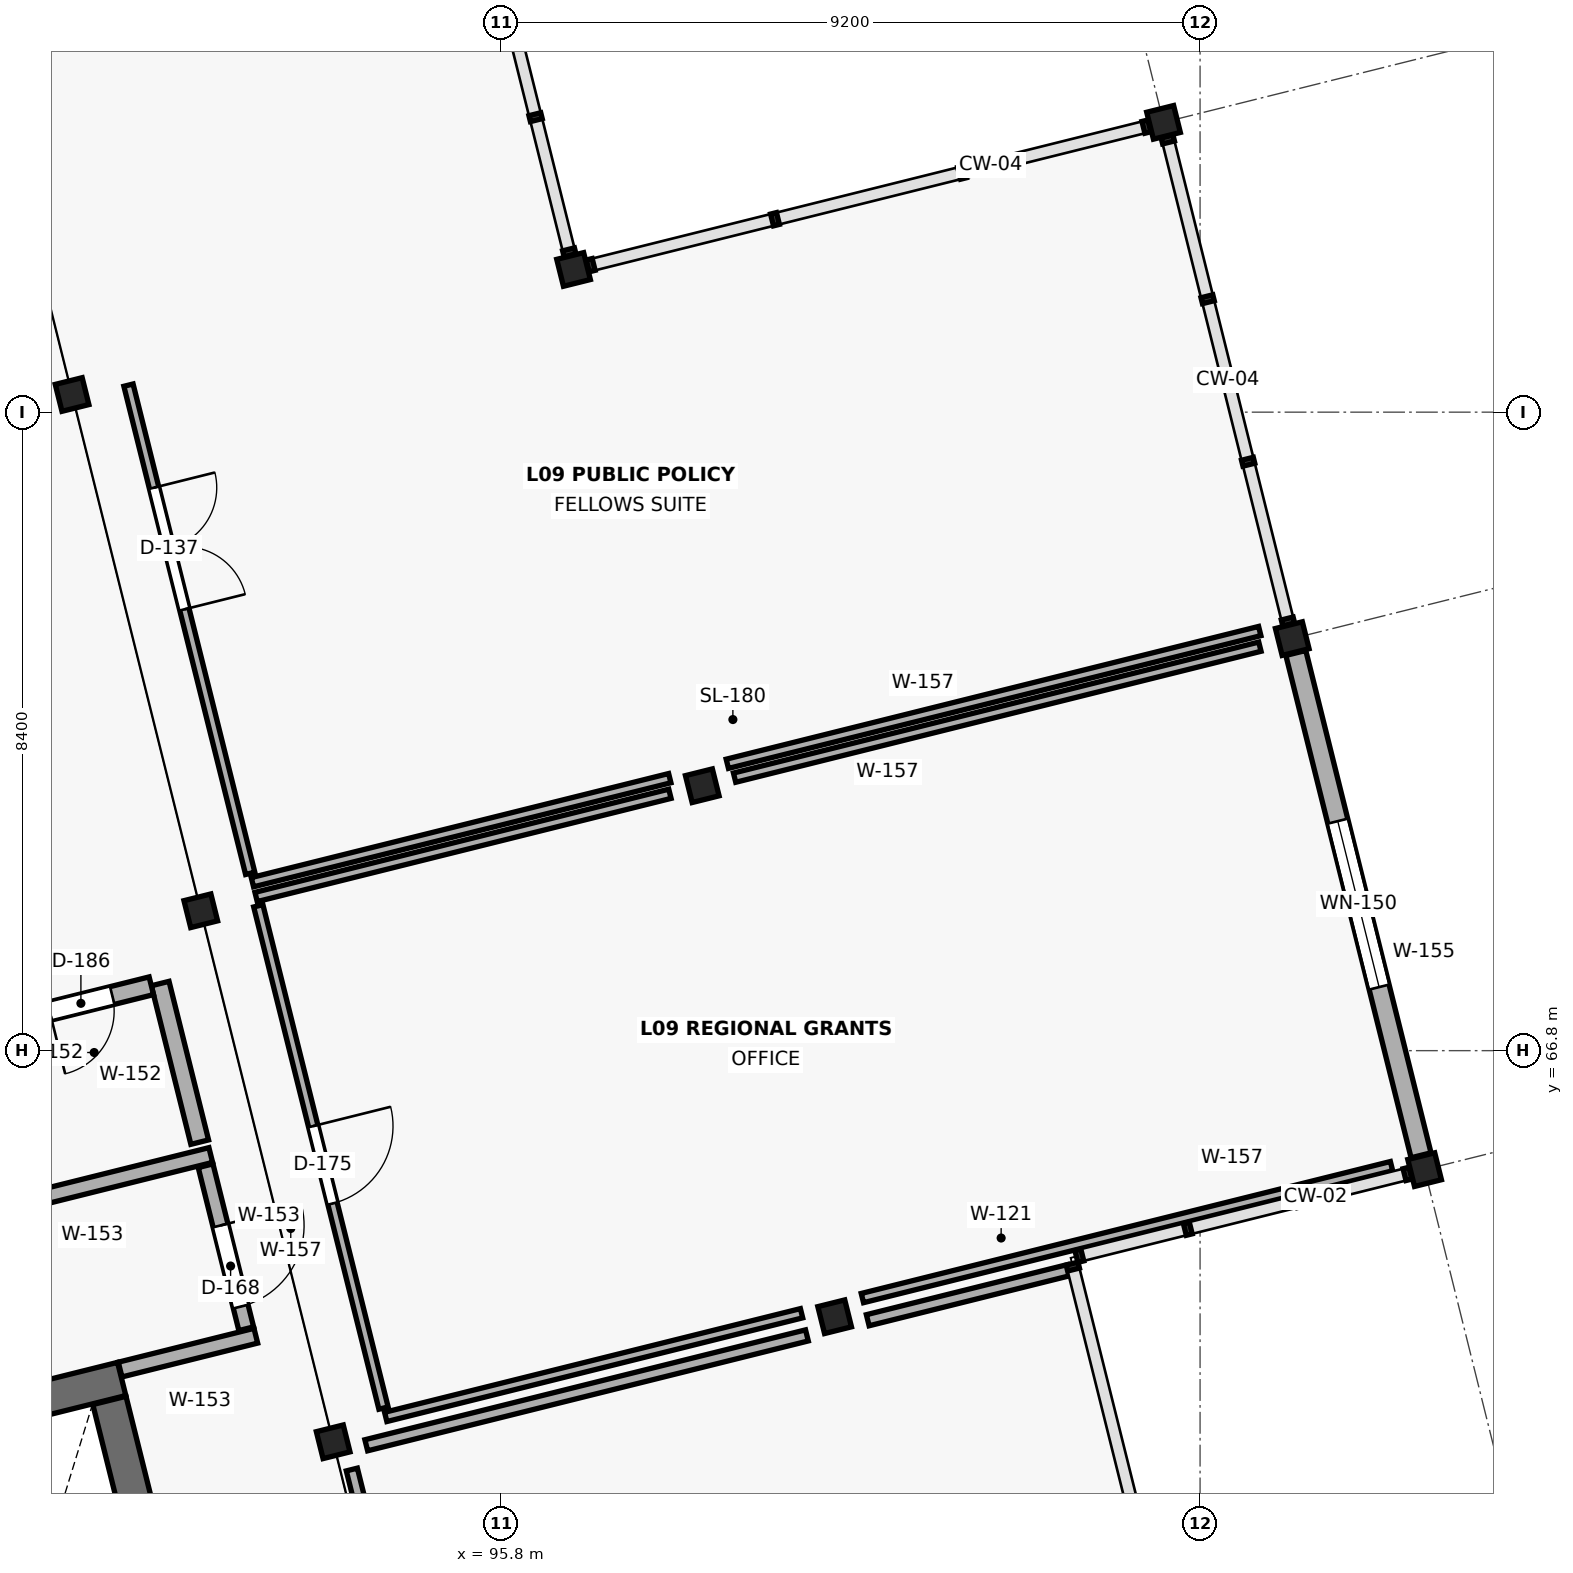
"""IFC4 building model, lengths in metres.
Left out: names, types, materials, properties, quantities, classifications, styles, units other than length and angle.
Written with IfcOpenShell. Run it as: python <this file> out.ifc"""

import sys

from ifc_helpers import new_model, si_unit, direction, frame, frame_2d, origin, origin_2d, place, context, subcontext, project, spatial, rectangle, extrude, element, fill, save


model = new_model("IFC4")
c1 = context("Model", 3, precision=1e-05, world=origin(), true_north=direction((0.0, 1.0)))
c2 = subcontext(c1, "Body", "Model", "MODEL_VIEW")
j1 = project(units=[si_unit("LENGTHUNIT", "METRE"), si_unit("PLANEANGLEUNIT", "RADIAN")], contexts=[c1])
p1 = place(None, origin())
s1 = spatial("IfcSite", under=j1, at=p1, CompositionType="ELEMENT")
p2 = place(p1, origin())
s2 = spatial("IfcBuilding", under=s1, at=p2, CompositionType="ELEMENT")
p3 = place(p2, frame((0.0, 0.0, 37.8)))
s3 = spatial("IfcBuildingStorey", under=s2, at=p3, CompositionType="ELEMENT", Elevation=37.8)
for number, where, z_axis, x_axis in (
    (1, (93.594, 61.654, 0.0), (0.0, 0.0, 1.0), (0.97, 0.242, 0.0)),
    (2, (91.852, 68.64, 0.0), (0.0, 0.0, 1.0), (0.97, 0.242, 0.0)),
    (3, (90.159, 75.432, 0.0), (0.0, 0.0, 1.0), (0.97, 0.242, 0.0)),
    (4, (100.192, 63.299, 0.0), (0.0, 0.0, 1.0), (0.97, 0.242, 0.0)),
    (5, (98.45, 70.285, 0.0), (0.0, 0.0, 1.0), (0.97, 0.242, 0.0)),
    (6, (96.757, 77.077, 0.0), (0.0, 0.0, 1.0), (0.97, 0.242, 0.0)),
    (7, (107.955, 65.235, 0.0), (0.0, 0.0, 1.0), (0.97, 0.242, 0.0)),
    (8, (106.213, 72.221, 0.0), (0.0, 0.0, 1.0), (0.97, 0.242, 0.0)),
    (9, (104.519, 79.013, 0.0), (0.0, 0.0, 1.0), (0.97, 0.242, 0.0)),
):
    element("IfcColumn", number, at=place(p3, frame(where, z_axis=z_axis, x_axis=x_axis)), inside=s3, PredefinedType="COLUMN", context=c2, shape_type="SweptSolid", body=[
        extrude(rectangle(XDim=0.365, YDim=0.365, at=origin_2d()), origin(), (0.0, 0.0, 1.0), 3.9),
    ])
p4 = place(p3, frame((106.26, 72.032, 0.0), z_axis=(0.0, 0.0, 1.0), x_axis=(0.241919880577, -0.970296228675, 0.0)))
e10 = element("IfcWall", 10, at=p4, inside=s3, PredefinedType="SOLIDWALL", context=c2, shape_type="SweptSolid", body=[
    extrude(rectangle(XDim=6.811, YDim=0.27, at=frame_2d((3.406, 0.0))), origin(), (0.0, 0.0, 1.0), 2.79),
])
p5 = place(p4, frame((2.281, 0.0, 0.8)))
e11 = element("IfcOpeningElement", 11, at=p5, cuts=e10, PredefinedType="OPENING", context=c2, shape_type="SweptSolid", body=[
    extrude(rectangle(XDim=2.25, YDim=1.95, at=frame_2d((1.125, 0.975))), frame((0.0, 0.147, 0.0), z_axis=(0.0, -1.0, 0.0), x_axis=(1.0, 0.0, 0.0)), (0.0, 0.0, 1.0), 0.294),
])
p6 = place(p3, frame((90.812, 62.48, 0.0), z_axis=(0.0, 0.0, 1.0), x_axis=(-0.970309259708, -0.2418676095, 0.0)))
e12 = element("IfcWall", 12, at=p6, inside=s3, PredefinedType="SHEAR", context=c2, shape_type="SweptSolid", body=[
    extrude(rectangle(XDim=4.3, YDim=0.45, at=frame_2d((2.15, 0.0))), origin(), (0.0, 0.0, 1.0), 3.72),
])
p7 = place(p3, frame((92.436, 55.037, 0.0), z_axis=(0.0, 0.0, 1.0), x_axis=(-0.241920660665, 0.970296034179, 0.0)))
e13 = element("IfcWall", 13, at=p7, inside=s3, PredefinedType="SHEAR", context=c2, shape_type="SweptSolid", body=[
    extrude(rectangle(XDim=7.38, YDim=0.45, at=frame_2d((3.69, 0.0))), origin(), (0.0, 0.0, 1.0), 3.72),
])
p8 = place(p3, frame((90.791, 62.604, 0.0), z_axis=(0.0, 0.0, 1.0), x_axis=(0.970306180373, 0.241879962645, 0.0)))
e14 = element("IfcWall", 14, at=p8, inside=s3, PredefinedType="STANDARD", context=c2, shape_type="SweptSolid", body=[
    extrude(rectangle(XDim=1.84, YDim=0.2, at=frame_2d((0.92, 0.0))), origin(), (0.0, 0.0, 1.0), 3.72),
])
p9 = place(p3, frame((89.218, 64.737, 0.0), z_axis=(0.0, 0.0, 1.0), x_axis=(0.97027839681, 0.241991389687, 0.0)))
e15 = element("IfcWall", 15, at=p9, inside=s3, PredefinedType="STANDARD", context=c2, shape_type="SweptSolid", body=[
    extrude(rectangle(XDim=2.85, YDim=0.2, at=frame_2d((1.425, 0.0))), origin(), (0.0, 0.0, 1.0), 3.72),
])
p10 = place(p3, frame((91.916, 65.286, 0.0), z_axis=(0.0, 0.0, 1.0), x_axis=(0.241911789465, -0.970298245963, 0.0)))
e16 = element("IfcWall", 16, at=p10, inside=s3, PredefinedType="STANDARD", context=c2, shape_type="SweptSolid", body=[
    extrude(rectangle(XDim=2.21, YDim=0.2, at=frame_2d((1.105, 0.0))), origin(), (0.0, 0.0, 1.0), 3.72),
])
p11 = place(p10, frame((0.81, 0.0, 0.0)))
e17 = element("IfcOpeningElement", 17, at=p11, cuts=e16, PredefinedType="OPENING", context=c2, shape_type="SweptSolid", body=[
    extrude(rectangle(XDim=1.1, YDim=2.2, at=frame_2d((0.55, 1.1))), frame((0.0, 0.112, 0.0), z_axis=(0.0, -1.0, 0.0), x_axis=(1.0, 0.0, 0.0)), (0.0, 0.0, 1.0), 0.224),
])
p12 = place(p3, frame((91.838, 65.596, 0.0), z_axis=(0.0, 0.0, 1.0), x_axis=(-0.2418676095, 0.970309259708, 0.0)))
e18 = element("IfcWall", 18, at=p12, inside=s3, PredefinedType="STANDARD", context=c2, shape_type="SweptSolid", body=[
    extrude(rectangle(XDim=2.15, YDim=0.24, at=frame_2d((1.075, 0.0))), origin(), (0.0, 0.0, 1.0), 3.72),
])
p13 = place(p3, frame((91.202, 67.654, 0.0), z_axis=(0.0, 0.0, 1.0), x_axis=(-0.970304433136, -0.241886971613, 0.0)))
e19 = element("IfcWall", 19, at=p13, inside=s3, PredefinedType="STANDARD", context=c2, shape_type="SweptSolid", body=[
    extrude(rectangle(XDim=2.48, YDim=0.24, at=frame_2d((1.24, 0.0))), origin(), (0.0, 0.0, 1.0), 3.72),
])
p14 = place(p13, frame((0.53, 0.0, 0.0)))
e20 = element("IfcOpeningElement", 20, at=p14, cuts=e19, PredefinedType="OPENING", context=c2, shape_type="SweptSolid", body=[
    extrude(rectangle(XDim=0.85, YDim=2.1, at=frame_2d((0.425, 1.05))), frame((0.0, 0.132, 0.0), z_axis=(0.0, -1.0, 0.0), x_axis=(1.0, 0.0, 0.0)), (0.0, 0.0, 1.0), 0.264),
])
p15 = place(p3, frame((103.275, 63.913, 0.0), z_axis=(0.0, 0.0, 1.0), x_axis=(-0.970289695095, -0.241946084059, 0.0)))
e21 = element("IfcWall", 21, at=p15, inside=s3, PredefinedType="PARTITIONING", context=c2, shape_type="SweptSolid", body=[
    extrude(rectangle(XDim=2.729, YDim=0.15, at=frame_2d((1.364, 0.0))), origin(), (0.0, 0.0, 1.0), 3.72),
])
p16 = place(p3, frame((99.827, 63.054, 0.0), z_axis=(0.0, 0.0, 1.0), x_axis=(-0.970293732071, -0.24192989378, 0.0)))
e22 = element("IfcWall", 22, at=p16, inside=s3, PredefinedType="PARTITIONING", context=c2, shape_type="SweptSolid", body=[
    extrude(rectangle(XDim=5.975, YDim=0.15, at=frame_2d((2.988, 0.0))), origin(), (0.0, 0.0, 1.0), 3.72),
])
p17 = place(p3, frame((93.84, 61.289, 0.0), z_axis=(0.0, 0.0, 1.0), x_axis=(0.241921603562, -0.970295799089, 0.0)))
e23 = element("IfcWall", 23, at=p17, inside=s3, PredefinedType="PARTITIONING", context=c2, shape_type="SweptSolid", body=[
    extrude(rectangle(XDim=6.175, YDim=0.15, at=frame_2d((3.087, 0.0))), origin(), (0.0, 0.0, 1.0), 3.035),
])
p18 = place(p3, frame((94.286, 61.981, 0.0), z_axis=(0.0, 0.0, 1.0), x_axis=(0.970297669748, 0.241914100624, 0.0)))
e24 = element("IfcWall", 24, at=p18, inside=s3, PredefinedType="PARTITIONING", context=c2, shape_type="SweptSolid", body=[
    extrude(rectangle(XDim=5.638, YDim=0.125, at=frame_2d((2.819, 0.0))), origin(), (0.0, 0.0, 1.0), 3.72),
])
p19 = place(p3, frame((100.557, 63.545, 0.0), z_axis=(0.0, 0.0, 1.0), x_axis=(0.970294426978, 0.241927106741, 0.0)))
e25 = element("IfcWall", 25, at=p19, inside=s3, PredefinedType="PARTITIONING", context=c2, shape_type="SweptSolid", body=[
    extrude(rectangle(XDim=7.175, YDim=0.125, at=frame_2d((3.587, 0.0))), origin(), (0.0, 0.0, 1.0), 3.72),
])
p20 = place(p3, frame((105.787, 72.115, 0.0), z_axis=(0.0, 0.0, 1.0), x_axis=(-0.97029150847, -0.241938811667, 0.0)))
e26 = element("IfcWall", 26, at=p20, inside=s3, PredefinedType="PARTITIONING", context=c2, shape_type="SweptSolid", body=[
    extrude(rectangle(XDim=7.123, YDim=0.125, at=frame_2d((3.562, 0.0))), origin(), (0.0, 0.0, 1.0), 3.027),
])
p21 = place(p3, frame((98.025, 70.179, 0.0), z_axis=(0.0, 0.0, 1.0), x_axis=(-0.970290753742, -0.24194183847, 0.0)))
e27 = element("IfcWall", 27, at=p21, inside=s3, PredefinedType="PARTITIONING", context=c2, shape_type="SweptSolid", body=[
    extrude(rectangle(XDim=5.612, YDim=0.125, at=frame_2d((2.806, 0.0))), origin(), (0.0, 0.0, 1.0), 3.027),
])
p22 = place(p3, frame((92.609, 68.705, 0.0), z_axis=(0.0, 0.0, 1.0), x_axis=(0.241919789553, -0.97029625137, 0.0)))
e28 = element("IfcWall", 28, at=p22, inside=s3, PredefinedType="PARTITIONING", context=c2, shape_type="SweptSolid", body=[
    extrude(rectangle(XDim=6.81, YDim=0.125, at=frame_2d((3.405, 0.0))), origin(), (0.0, 0.0, 1.0), 3.72),
])
p23 = place(p22, frame((2.987, 0.0, 0.0)))
e29 = element("IfcOpeningElement", 29, at=p23, cuts=e28, PredefinedType="OPENING", context=c2, shape_type="SweptSolid", body=[
    extrude(rectangle(XDim=1.05, YDim=2.25, at=frame_2d((0.525, 1.125))), frame((0.0, 0.074, 0.0), z_axis=(0.0, -1.0, 0.0), x_axis=(1.0, 0.0, 0.0)), (0.0, 0.0, 1.0), 0.149),
])
p24 = place(p3, frame((92.531, 69.016, 0.0), z_axis=(0.0, 0.0, 1.0), x_axis=(0.970297090917, 0.241916422259, 0.0)))
e30 = element("IfcWall", 30, at=p24, inside=s3, PredefinedType="PARTITIONING", context=c2, shape_type="SweptSolid", body=[
    extrude(rectangle(XDim=5.66, YDim=0.125, at=frame_2d((2.83, 0.0))), origin(), (0.0, 0.0, 1.0), 3.72),
])
p25 = place(p3, frame((98.78, 70.574, 0.0), z_axis=(0.0, 0.0, 1.0), x_axis=(0.970295475322, 0.241922902117, 0.0)))
e31 = element("IfcWall", 31, at=p25, inside=s3, PredefinedType="PARTITIONING", context=c2, shape_type="SweptSolid", body=[
    extrude(rectangle(XDim=7.219, YDim=0.125, at=frame_2d((3.61, 0.0))), origin(), (0.0, 0.0, 1.0), 3.72),
])
p26 = place(p3, frame((90.901, 75.556, 0.0), z_axis=(0.0, 0.0, 1.0), x_axis=(0.241928153868, -0.970294165893, 0.0)))
e32 = element("IfcWall", 32, at=p26, inside=s3, PredefinedType="PARTITIONING", context=c2, shape_type="SweptSolid", body=[
    extrude(rectangle(XDim=6.62, YDim=0.125, at=frame_2d((3.31, 0.0))), origin(), (0.0, 0.0, 1.0), 3.72),
])
p27 = place(p26, frame((1.39, 0.0, 0.0)))
e33 = element("IfcOpeningElement", 33, at=p27, cuts=e32, PredefinedType="OPENING", context=c2, shape_type="SweptSolid", body=[
    extrude(rectangle(XDim=1.65, YDim=2.35, at=frame_2d((0.825, 1.175))), frame((0.0, 0.074, 0.0), z_axis=(0.0, -1.0, 0.0), x_axis=(1.0, 0.0, 0.0)), (0.0, 0.0, 1.0), 0.149),
])
p28 = place(p5, origin())
e34 = element("IfcWindow", 34, at=p28, inside=s3, PartitioningType="SINGLE_PANEL", PredefinedType="WINDOW", context=c2, shape_type="SweptSolid", body=[
    extrude(rectangle(XDim=2.25, YDim=1.95, at=frame_2d((1.125, 0.975))), frame((0.0, 0.03, 0.0), z_axis=(0.0, -1.0, 0.0), x_axis=(1.0, 0.0, 0.0)), (0.0, 0.0, 1.0), 0.06),
])
fill(e11, e34)
p29 = place(p11, origin())
e35 = element("IfcDoor", 35, at=p29, inside=s3, OperationType="SINGLE_SWING_LEFT", PredefinedType="DOOR", context=c2, shape_type="SweptSolid", body=[
    extrude(rectangle(XDim=1.1, YDim=2.2, at=frame_2d((0.55, 1.1))), frame((0.0, 0.025, 0.0), z_axis=(0.0, -1.0, 0.0), x_axis=(1.0, 0.0, 0.0)), (0.0, 0.0, 1.0), 0.05),
])
fill(e17, e35)
p30 = place(p14, origin())
e36 = element("IfcDoor", 36, at=p30, inside=s3, OperationType="SINGLE_SWING_RIGHT", PredefinedType="DOOR", context=c2, shape_type="SweptSolid", body=[
    extrude(rectangle(XDim=0.85, YDim=2.1, at=frame_2d((0.425, 1.05))), frame((0.0, 0.025, 0.0), z_axis=(0.0, -1.0, 0.0), x_axis=(1.0, 0.0, 0.0)), (0.0, 0.0, 1.0), 0.05),
])
fill(e20, e36)
p31 = place(p23, origin())
e37 = element("IfcDoor", 37, at=p31, inside=s3, OperationType="SINGLE_SWING_LEFT", PredefinedType="DOOR", context=c2, shape_type="SweptSolid", body=[
    extrude(rectangle(XDim=1.05, YDim=2.25, at=frame_2d((0.525, 1.125))), frame((0.0, 0.025, 0.0), z_axis=(0.0, -1.0, 0.0), x_axis=(1.0, 0.0, 0.0)), (0.0, 0.0, 1.0), 0.05),
])
fill(e29, e37)
p32 = place(p27, origin())
e38 = element("IfcDoor", 38, at=p32, inside=s3, OperationType="DOUBLE_DOOR_SINGLE_SWING", PredefinedType="DOOR", context=c2, shape_type="SweptSolid", body=[
    extrude(rectangle(XDim=1.65, YDim=2.35, at=frame_2d((0.825, 1.175))), frame((0.0, 0.025, 0.0), z_axis=(0.0, -1.0, 0.0), x_axis=(1.0, 0.0, 0.0)), (0.0, 0.0, 1.0), 0.05),
])
fill(e33, e38)
save(model, sys.argv[1])
